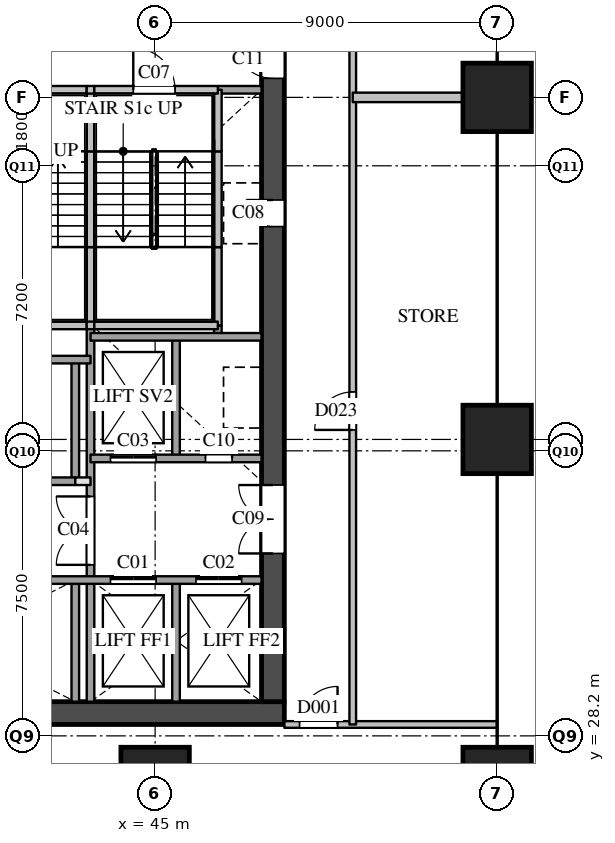
"""IFC4 building model, lengths in metres.
Left out: names, types, materials, properties, quantities, classifications, styles, units other than length and angle.
Written with IfcOpenShell. Run it as: python <this file> out.ifc"""

import sys

from ifc_helpers import new_model, si_unit, direction, frame, frame_2d, origin, origin_2d, place, context, subcontext, project, spatial, rectangle, extrude, element, fill, save


model = new_model("IFC4")
c1 = context("Model", 3, precision=1e-05, world=origin(), true_north=direction((0.0, 1.0)))
c2 = subcontext(c1, "Body", "Model", "MODEL_VIEW")
j1 = project(units=[si_unit("LENGTHUNIT", "METRE"), si_unit("PLANEANGLEUNIT", "RADIAN")], contexts=[c1])
p1 = place(None, origin())
s1 = spatial("IfcSite", under=j1, at=p1, CompositionType="ELEMENT")
p2 = place(p1, origin())
s2 = spatial("IfcBuilding", under=s1, at=p2, CompositionType="ELEMENT")
p3 = place(p2, frame((0.0, 0.0, 14.0)))
s3 = spatial("IfcBuildingStorey", under=s2, at=p3, CompositionType="ELEMENT", Elevation=14.0)
for number, where, z_axis, x_axis in (
    (1, (45.0, 27.0, 0.0), (0.0, 0.0, 1.0), (1.0, 0.0, 0.0)),
    (2, (54.0, 27.0, 0.0), (0.0, 0.0, 1.0), (1.0, 0.0, 0.0)),
    (3, (54.0, 36.0, 0.0), (0.0, 0.0, 1.0), (1.0, 0.0, 0.0)),
    (4, (54.0, 45.0, 0.0), (0.0, 0.0, 1.0), (1.0, 0.0, 0.0)),
):
    element("IfcColumn", number, at=place(p3, frame(where, z_axis=z_axis, x_axis=x_axis)), inside=s3, PredefinedType="COLUMN", context=c2, shape_type="SweptSolid", body=[
        extrude(rectangle(XDim=1.8, YDim=1.8, at=origin_2d()), origin(), (0.0, 0.0, 1.0), 7.0),
    ])
p4 = place(p3, frame((36.0, 28.8, 0.0), z_axis=(0.0, 0.0, 1.0), x_axis=(1.0, 0.0, 0.0)))
e5 = element("IfcWall", 5, at=p4, inside=s3, PredefinedType="SHEAR", context=c2, shape_type="SweptSolid", body=[
    extrude(rectangle(XDim=12.4, YDim=0.6, at=frame_2d((6.2, 0.0))), origin(), (0.0, 0.0, 1.0), 6.59),
])
p5 = place(p3, frame((48.1, 29.1, 0.0), z_axis=(0.0, 0.0, 1.0), x_axis=(0.0, 1.0, 0.0)))
e6 = element("IfcWall", 6, at=p5, inside=s3, PredefinedType="SHEAR", context=c2, shape_type="SweptSolid", body=[
    extrude(rectangle(XDim=20.3, YDim=0.6, at=frame_2d((10.15, 0.0))), origin(), (0.0, 0.0, 1.0), 6.59),
])
p6 = place(p5, frame((12.5, 0.0, 0.0)))
e7 = element("IfcOpeningElement", 7, at=p6, cuts=e6, PredefinedType="OPENING", context=c2, shape_type="SweptSolid", body=[
    extrude(rectangle(XDim=0.7, YDim=2.1, at=frame_2d((0.35, 1.05))), frame((0.0, 0.31, 0.0), z_axis=(0.0, -1.0, 0.0), x_axis=(1.0, 0.0, 0.0)), (0.0, 0.0, 1.0), 0.62),
])
p7 = place(p5, frame((3.9, 0.0, 0.0)))
e8 = element("IfcOpeningElement", 8, at=p7, cuts=e6, PredefinedType="OPENING", context=c2, shape_type="SweptSolid", body=[
    extrude(rectangle(XDim=1.8, YDim=2.1, at=frame_2d((0.9, 1.05))), frame((0.0, 0.31, 0.0), z_axis=(0.0, -1.0, 0.0), x_axis=(1.0, 0.0, 0.0)), (0.0, 0.0, 1.0), 0.62),
])
p8 = place(p5, frame((16.4, 0.0, 0.0)))
e9 = element("IfcOpeningElement", 9, at=p8, cuts=e6, PredefinedType="OPENING", context=c2, shape_type="SweptSolid", body=[
    extrude(rectangle(XDim=1.0, YDim=2.1, at=frame_2d((0.5, 1.05))), frame((0.0, 0.31, 0.0), z_axis=(0.0, -1.0, 0.0), x_axis=(1.0, 0.0, 0.0)), (0.0, 0.0, 1.0), 0.62),
])
p9 = place(p3, frame((42.9, 29.1, 0.0), z_axis=(0.0, 0.0, 1.0), x_axis=(0.0, 1.0, 0.0)))
e10 = element("IfcWall", 10, at=p9, inside=s3, PredefinedType="SOLIDWALL", context=c2, shape_type="SweptSolid", body=[
    extrude(rectangle(XDim=3.2, YDim=0.2, at=frame_2d((1.6, 0.0))), origin(), (0.0, 0.0, 1.0), 6.59),
])
p10 = place(p3, frame((42.9, 34.9, 0.0), z_axis=(0.0, 0.0, 1.0), x_axis=(0.0, 1.0, 0.0)))
e11 = element("IfcWall", 11, at=p10, inside=s3, PredefinedType="SOLIDWALL", context=c2, shape_type="SweptSolid", body=[
    extrude(rectangle(XDim=3.2, YDim=0.2, at=frame_2d((1.6, 0.0))), origin(), (0.0, 0.0, 1.0), 6.59),
])
p11 = place(p3, frame((43.3, 29.1, 0.0), z_axis=(0.0, 0.0, 1.0), x_axis=(0.0, 1.0, 0.0)))
e12 = element("IfcWall", 12, at=p11, inside=s3, PredefinedType="SOLIDWALL", context=c2, shape_type="SweptSolid", body=[
    extrude(rectangle(XDim=9.9, YDim=0.2, at=frame_2d((4.95, 0.0))), origin(), (0.0, 0.0, 1.0), 6.59),
])
p12 = place(p11, frame((3.6, 0.0, 0.0)))
e13 = element("IfcOpeningElement", 13, at=p12, cuts=e12, PredefinedType="OPENING", context=c2, shape_type="SweptSolid", body=[
    extrude(rectangle(XDim=1.8, YDim=2.1, at=frame_2d((0.9, 1.05))), frame((0.0, 0.11, 0.0), z_axis=(0.0, -1.0, 0.0), x_axis=(1.0, 0.0, 0.0)), (0.0, 0.0, 1.0), 0.22),
])
p13 = place(p3, frame((43.3, 39.0, 0.0), z_axis=(0.0, 0.0, 1.0), x_axis=(0.0, 1.0, 0.0)))
e14 = element("IfcWall", 14, at=p13, inside=s3, PredefinedType="SOLIDWALL", context=c2, shape_type="SweptSolid", body=[
    extrude(rectangle(XDim=2.06, YDim=0.2, at=frame_2d((1.03, 0.0))), origin(), (0.0, 0.0, 1.0), 6.59),
])
p14 = place(p3, frame((43.3, 41.06, 0.0), z_axis=(0.0, 0.0, 1.0), x_axis=(0.0, 1.0, 0.0)))
e15 = element("IfcWall", 15, at=p14, inside=s3, PredefinedType="SOLIDWALL", context=c2, shape_type="SweptSolid", body=[
    extrude(rectangle(XDim=2.52, YDim=0.2, at=frame_2d((1.26, 0.0))), origin(), (0.0, 0.0, 1.0), 6.59),
])
p15 = place(p3, frame((43.3, 43.58, 0.0), z_axis=(0.0, 0.0, 1.0), x_axis=(0.0, 1.0, 0.0)))
e16 = element("IfcWall", 16, at=p15, inside=s3, PredefinedType="SOLIDWALL", context=c2, shape_type="SweptSolid", body=[
    extrude(rectangle(XDim=1.62, YDim=0.2, at=frame_2d((0.81, 0.0))), origin(), (0.0, 0.0, 1.0), 6.59),
])
for number, where, z_axis, x_axis in (
    (17, (45.55, 29.1, 0.0), (0.0, 0.0, 1.0), (0.0, 1.0, 0.0)),
    (18, (45.55, 35.5, 0.0), (0.0, 0.0, 1.0), (0.0, 1.0, 0.0)),
):
    element("IfcWall", number, at=place(p3, frame(where, z_axis=z_axis, x_axis=x_axis)), inside=s3, PredefinedType="SOLIDWALL", context=c2, shape_type="SweptSolid", body=[
        extrude(rectangle(XDim=3.2, YDim=0.2, at=frame_2d((1.6, 0.0))), origin(), (0.0, 0.0, 1.0), 6.59),
    ])
p16 = place(p3, frame((46.65, 38.7, 0.0), z_axis=(0.0, 0.0, 1.0), x_axis=(0.0, 1.0, 0.0)))
e19 = element("IfcWall", 19, at=p16, inside=s3, PredefinedType="SOLIDWALL", context=c2, shape_type="SweptSolid", body=[
    extrude(rectangle(XDim=0.3, YDim=0.2, at=frame_2d((0.15, 0.0))), origin(), (0.0, 0.0, 1.0), 6.59),
])
p17 = place(p3, frame((46.65, 39.0, 0.0), z_axis=(0.0, 0.0, 1.0), x_axis=(0.0, 1.0, 0.0)))
e20 = element("IfcWall", 20, at=p17, inside=s3, PredefinedType="SOLIDWALL", context=c2, shape_type="SweptSolid", body=[
    extrude(rectangle(XDim=2.06, YDim=0.2, at=frame_2d((1.03, 0.0))), origin(), (0.0, 0.0, 1.0), 6.59),
])
p18 = place(p3, frame((46.65, 41.06, 0.0), z_axis=(0.0, 0.0, 1.0), x_axis=(0.0, 1.0, 0.0)))
e21 = element("IfcWall", 21, at=p18, inside=s3, PredefinedType="SOLIDWALL", context=c2, shape_type="SweptSolid", body=[
    extrude(rectangle(XDim=2.52, YDim=0.2, at=frame_2d((1.26, 0.0))), origin(), (0.0, 0.0, 1.0), 6.59),
])
p19 = place(p3, frame((46.65, 43.58, 0.0), z_axis=(0.0, 0.0, 1.0), x_axis=(0.0, 1.0, 0.0)))
e22 = element("IfcWall", 22, at=p19, inside=s3, PredefinedType="SOLIDWALL", context=c2, shape_type="SweptSolid", body=[
    extrude(rectangle(XDim=1.62, YDim=0.2, at=frame_2d((0.81, 0.0))), origin(), (0.0, 0.0, 1.0), 6.59),
])
p20 = place(p3, frame((36.6, 32.3, 0.0), z_axis=(0.0, 0.0, 1.0), x_axis=(1.0, 0.0, 0.0)))
e23 = element("IfcWall", 23, at=p20, inside=s3, PredefinedType="SOLIDWALL", context=c2, shape_type="SweptSolid", body=[
    extrude(rectangle(XDim=11.2, YDim=0.2, at=frame_2d((5.6, 0.0))), origin(), (0.0, 0.0, 1.0), 6.59),
])
p21 = place(p20, frame((7.225, 0.0, 0.0)))
e24 = element("IfcOpeningElement", 24, at=p21, cuts=e23, PredefinedType="OPENING", context=c2, shape_type="SweptSolid", body=[
    extrude(rectangle(XDim=1.2, YDim=2.1, at=frame_2d((0.6, 1.05))), frame((0.0, 0.11, 0.0), z_axis=(0.0, -1.0, 0.0), x_axis=(1.0, 0.0, 0.0)), (0.0, 0.0, 1.0), 0.22),
])
p22 = place(p20, frame((9.475, 0.0, 0.0)))
e25 = element("IfcOpeningElement", 25, at=p22, cuts=e23, PredefinedType="OPENING", context=c2, shape_type="SweptSolid", body=[
    extrude(rectangle(XDim=1.2, YDim=2.1, at=frame_2d((0.6, 1.05))), frame((0.0, 0.11, 0.0), z_axis=(0.0, -1.0, 0.0), x_axis=(1.0, 0.0, 0.0)), (0.0, 0.0, 1.0), 0.22),
])
p23 = place(p3, frame((42.9, 34.9, 0.0), z_axis=(0.0, 0.0, 1.0), x_axis=(1.0, 0.0, 0.0)))
e26 = element("IfcWall", 26, at=p23, inside=s3, PredefinedType="PARTITIONING", context=c2, shape_type="SweptSolid", body=[
    extrude(rectangle(XDim=0.4, YDim=0.2, at=frame_2d((0.2, 0.0))), origin(), (0.0, 0.0, 1.0), 6.59),
])
p24 = place(p3, frame((36.6, 34.9, 0.0), z_axis=(0.0, 0.0, 1.0), x_axis=(1.0, 0.0, 0.0)))
e27 = element("IfcWall", 27, at=p24, inside=s3, PredefinedType="SOLIDWALL", context=c2, shape_type="SweptSolid", body=[
    extrude(rectangle(XDim=6.3, YDim=0.2, at=frame_2d((3.15, 0.0))), origin(), (0.0, 0.0, 1.0), 6.59),
])
p25 = place(p3, frame((43.3, 35.5, 0.0), z_axis=(0.0, 0.0, 1.0), x_axis=(1.0, 0.0, 0.0)))
e28 = element("IfcWall", 28, at=p25, inside=s3, PredefinedType="SOLIDWALL", context=c2, shape_type="SweptSolid", body=[
    extrude(rectangle(XDim=4.5, YDim=0.2, at=frame_2d((2.25, 0.0))), origin(), (0.0, 0.0, 1.0), 6.59),
])
p26 = place(p25, frame((0.525, 0.0, 0.0)))
e29 = element("IfcOpeningElement", 29, at=p26, cuts=e28, PredefinedType="OPENING", context=c2, shape_type="SweptSolid", body=[
    extrude(rectangle(XDim=1.2, YDim=2.1, at=frame_2d((0.6, 1.05))), frame((0.0, 0.11, 0.0), z_axis=(0.0, -1.0, 0.0), x_axis=(1.0, 0.0, 0.0)), (0.0, 0.0, 1.0), 0.22),
])
p27 = place(p25, frame((3.025, 0.0, 0.0)))
e30 = element("IfcOpeningElement", 30, at=p27, cuts=e28, PredefinedType="OPENING", context=c2, shape_type="SweptSolid", body=[
    extrude(rectangle(XDim=0.7, YDim=2.1, at=frame_2d((0.35, 1.05))), frame((0.0, 0.11, 0.0), z_axis=(0.0, -1.0, 0.0), x_axis=(1.0, 0.0, 0.0)), (0.0, 0.0, 1.0), 0.22),
])
p28 = place(p3, frame((36.6, 38.1, 0.0), z_axis=(0.0, 0.0, 1.0), x_axis=(1.0, 0.0, 0.0)))
e31 = element("IfcWall", 31, at=p28, inside=s3, PredefinedType="SOLIDWALL", context=c2, shape_type="SweptSolid", body=[
    extrude(rectangle(XDim=6.7, YDim=0.2, at=frame_2d((3.35, 0.0))), origin(), (0.0, 0.0, 1.0), 6.59),
])
p29 = place(p3, frame((43.3, 38.7, 0.0), z_axis=(0.0, 0.0, 1.0), x_axis=(1.0, 0.0, 0.0)))
e32 = element("IfcWall", 32, at=p29, inside=s3, PredefinedType="SOLIDWALL", context=c2, shape_type="SweptSolid", body=[
    extrude(rectangle(XDim=4.5, YDim=0.2, at=frame_2d((2.25, 0.0))), origin(), (0.0, 0.0, 1.0), 6.59),
])
p30 = place(p3, frame((40.05, 39.0, 0.0), z_axis=(0.0, 0.0, 1.0), x_axis=(1.0, 0.0, 0.0)))
e33 = element("IfcWall", 33, at=p30, inside=s3, PredefinedType="SOLIDWALL", context=c2, shape_type="SweptSolid", body=[
    extrude(rectangle(XDim=3.15, YDim=0.2, at=frame_2d((1.575, 0.0))), origin(), (0.0, 0.0, 1.0), 6.59),
])
p31 = place(p3, frame((43.2, 39.0, 0.0), z_axis=(0.0, 0.0, 1.0), x_axis=(1.0, 0.0, 0.0)))
e34 = element("IfcWall", 34, at=p31, inside=s3, PredefinedType="SOLIDWALL", context=c2, shape_type="SweptSolid", body=[
    extrude(rectangle(XDim=0.2, YDim=0.2, at=frame_2d((0.1, 0.0))), origin(), (0.0, 0.0, 1.0), 6.59),
])
p32 = place(p3, frame((43.4, 39.0, 0.0), z_axis=(0.0, 0.0, 1.0), x_axis=(1.0, 0.0, 0.0)))
e35 = element("IfcWall", 35, at=p32, inside=s3, PredefinedType="SOLIDWALL", context=c2, shape_type="SweptSolid", body=[
    extrude(rectangle(XDim=3.25, YDim=0.2, at=frame_2d((1.625, 0.0))), origin(), (0.0, 0.0, 1.0), 6.59),
])
p33 = place(p3, frame((46.65, 45.2, 0.0), z_axis=(0.0, 0.0, 1.0), x_axis=(1.0, 0.0, 0.0)))
e36 = element("IfcWall", 36, at=p33, inside=s3, PredefinedType="SOLIDWALL", context=c2, shape_type="SweptSolid", body=[
    extrude(rectangle(XDim=1.15, YDim=0.2, at=frame_2d((0.575, 0.0))), origin(), (0.0, 0.0, 1.0), 6.59),
])
p34 = place(p3, frame((40.05, 45.2, 0.0), z_axis=(0.0, 0.0, 1.0), x_axis=(1.0, 0.0, 0.0)))
e37 = element("IfcWall", 37, at=p34, inside=s3, PredefinedType="SOLIDWALL", context=c2, shape_type="SweptSolid", body=[
    extrude(rectangle(XDim=3.15, YDim=0.2, at=frame_2d((1.575, 0.0))), origin(), (0.0, 0.0, 1.0), 6.59),
])
p35 = place(p34, frame((1.025, 0.0, 0.0)))
e38 = element("IfcOpeningElement", 38, at=p35, cuts=e37, PredefinedType="OPENING", context=c2, shape_type="SweptSolid", body=[
    extrude(rectangle(XDim=1.1, YDim=2.1, at=frame_2d((0.55, 1.05))), frame((0.0, 0.11, 0.0), z_axis=(0.0, -1.0, 0.0), x_axis=(1.0, 0.0, 0.0)), (0.0, 0.0, 1.0), 0.22),
])
p36 = place(p3, frame((43.2, 45.2, 0.0), z_axis=(0.0, 0.0, 1.0), x_axis=(1.0, 0.0, 0.0)))
e39 = element("IfcWall", 39, at=p36, inside=s3, PredefinedType="SOLIDWALL", context=c2, shape_type="SweptSolid", body=[
    extrude(rectangle(XDim=0.2, YDim=0.2, at=frame_2d((0.1, 0.0))), origin(), (0.0, 0.0, 1.0), 6.59),
])
p37 = place(p3, frame((43.4, 45.2, 0.0), z_axis=(0.0, 0.0, 1.0), x_axis=(1.0, 0.0, 0.0)))
e40 = element("IfcWall", 40, at=p37, inside=s3, PredefinedType="SOLIDWALL", context=c2, shape_type="SweptSolid", body=[
    extrude(rectangle(XDim=3.25, YDim=0.2, at=frame_2d((1.625, 0.0))), origin(), (0.0, 0.0, 1.0), 6.59),
])
p38 = place(p37, frame((1.025, 0.0, 0.0)))
e41 = element("IfcOpeningElement", 41, at=p38, cuts=e40, PredefinedType="OPENING", context=c2, shape_type="SweptSolid", body=[
    extrude(rectangle(XDim=1.1, YDim=2.1, at=frame_2d((0.55, 1.05))), frame((0.0, 0.11, 0.0), z_axis=(0.0, -1.0, 0.0), x_axis=(1.0, 0.0, 0.0)), (0.0, 0.0, 1.0), 0.22),
])
p39 = place(p3, frame((48.4, 28.5, 0.0), z_axis=(0.0, 0.0, 1.0), x_axis=(1.0, 0.0, 0.0)))
e42 = element("IfcWall", 42, at=p39, inside=s3, PredefinedType="PARTITIONING", context=c2, shape_type="SweptSolid", body=[
    extrude(rectangle(XDim=5.6, YDim=0.175, at=frame_2d((2.8, 0.0))), origin(), (0.0, 0.0, 1.0), 5.59),
])
p40 = place(p39, frame((0.4, 0.0, 0.0)))
e43 = element("IfcOpeningElement", 43, at=p40, cuts=e42, PredefinedType="OPENING", context=c2, shape_type="SweptSolid", body=[
    extrude(rectangle(XDim=1.0, YDim=2.1, at=frame_2d((0.5, 1.05))), frame((0.0, 0.097, 0.0), z_axis=(0.0, -1.0, 0.0), x_axis=(1.0, 0.0, 0.0)), (0.0, 0.0, 1.0), 0.195),
])
p41 = place(p3, frame((50.2, 28.5, 0.0), z_axis=(0.0, 0.0, 1.0), x_axis=(0.0, 1.0, 0.0)))
e44 = element("IfcWall", 44, at=p41, inside=s3, PredefinedType="PARTITIONING", context=c2, shape_type="SweptSolid", body=[
    extrude(rectangle(XDim=21.5, YDim=0.175, at=frame_2d((10.75, 0.0))), origin(), (0.0, 0.0, 1.0), 6.59),
])
p42 = place(p41, frame((18.5, 0.0, 0.0)))
e45 = element("IfcOpeningElement", 45, at=p42, cuts=e44, PredefinedType="OPENING", context=c2, shape_type="SweptSolid", body=[
    extrude(rectangle(XDim=1.0, YDim=2.1, at=frame_2d((0.5, 1.05))), frame((0.0, 0.097, 0.0), z_axis=(0.0, -1.0, 0.0), x_axis=(1.0, 0.0, 0.0)), (0.0, 0.0, 1.0), 0.195),
])
p43 = place(p41, frame((7.75, 0.0, 0.0)))
e46 = element("IfcOpeningElement", 46, at=p43, cuts=e44, PredefinedType="OPENING", context=c2, shape_type="SweptSolid", body=[
    extrude(rectangle(XDim=1.0, YDim=2.1, at=frame_2d((0.5, 1.05))), frame((0.0, 0.097, 0.0), z_axis=(0.0, -1.0, 0.0), x_axis=(1.0, 0.0, 0.0)), (0.0, 0.0, 1.0), 0.195),
])
p44 = place(p3, frame((50.2, 45.0, 0.0), z_axis=(0.0, 0.0, 1.0), x_axis=(1.0, 0.0, 0.0)))
e47 = element("IfcWall", 47, at=p44, inside=s3, PredefinedType="PARTITIONING", context=c2, shape_type="SweptSolid", body=[
    extrude(rectangle(XDim=3.8, YDim=0.25, at=frame_2d((1.9, 0.0))), origin(), (0.0, 0.0, 1.0), 6.59),
])
p45 = place(p21, origin())
e48 = element("IfcDoor", 48, at=p45, inside=s3, OperationType="SLIDING_TO_LEFT", PredefinedType="DOOR", context=c2, shape_type="SweptSolid", body=[
    extrude(rectangle(XDim=1.2, YDim=2.1, at=frame_2d((0.6, 1.05))), frame((0.0, 0.025, 0.0), z_axis=(0.0, -1.0, 0.0), x_axis=(1.0, 0.0, 0.0)), (0.0, 0.0, 1.0), 0.05),
])
fill(e24, e48)
p46 = place(p22, origin())
e49 = element("IfcDoor", 49, at=p46, inside=s3, OperationType="SLIDING_TO_LEFT", PredefinedType="DOOR", context=c2, shape_type="SweptSolid", body=[
    extrude(rectangle(XDim=1.2, YDim=2.1, at=frame_2d((0.6, 1.05))), frame((0.0, 0.025, 0.0), z_axis=(0.0, -1.0, 0.0), x_axis=(1.0, 0.0, 0.0)), (0.0, 0.0, 1.0), 0.05),
])
fill(e25, e49)
p47 = place(p26, origin())
e50 = element("IfcDoor", 50, at=p47, inside=s3, OperationType="SLIDING_TO_LEFT", PredefinedType="DOOR", context=c2, shape_type="SweptSolid", body=[
    extrude(rectangle(XDim=1.2, YDim=2.1, at=frame_2d((0.6, 1.05))), frame((0.0, 0.025, 0.0), z_axis=(0.0, -1.0, 0.0), x_axis=(1.0, 0.0, 0.0)), (0.0, 0.0, 1.0), 0.05),
])
fill(e29, e50)
p48 = place(p12, origin())
e51 = element("IfcDoor", 51, at=p48, inside=s3, OperationType="DOUBLE_DOOR_SINGLE_SWING", PredefinedType="DOOR", context=c2, shape_type="SweptSolid", body=[
    extrude(rectangle(XDim=1.8, YDim=2.1, at=frame_2d((0.9, 1.05))), frame((0.0, 0.025, 0.0), z_axis=(0.0, -1.0, 0.0), x_axis=(1.0, 0.0, 0.0)), (0.0, 0.0, 1.0), 0.05),
])
fill(e13, e51)
p49 = place(p38, origin())
e52 = element("IfcDoor", 52, at=p49, inside=s3, OperationType="SINGLE_SWING_LEFT", PredefinedType="DOOR", context=c2, shape_type="SweptSolid", body=[
    extrude(rectangle(XDim=1.1, YDim=2.1, at=frame_2d((0.55, 1.05))), frame((0.0, 0.025, 0.0), z_axis=(0.0, -1.0, 0.0), x_axis=(1.0, 0.0, 0.0)), (0.0, 0.0, 1.0), 0.05),
])
fill(e41, e52)
p50 = place(p6, origin())
e53 = element("IfcDoor", 53, at=p50, inside=s3, OperationType="SINGLE_SWING_RIGHT", PredefinedType="DOOR", context=c2, shape_type="SweptSolid", body=[
    extrude(rectangle(XDim=0.7, YDim=2.1, at=frame_2d((0.35, 1.05))), frame((0.0, 0.025, 0.0), z_axis=(0.0, -1.0, 0.0), x_axis=(1.0, 0.0, 0.0)), (0.0, 0.0, 1.0), 0.05),
])
fill(e7, e53)
p51 = place(p7, origin())
e54 = element("IfcDoor", 54, at=p51, inside=s3, OperationType="DOUBLE_DOOR_SINGLE_SWING", PredefinedType="DOOR", context=c2, shape_type="SweptSolid", body=[
    extrude(rectangle(XDim=1.8, YDim=2.1, at=frame_2d((0.9, 1.05))), frame((0.0, 0.025, 0.0), z_axis=(0.0, -1.0, 0.0), x_axis=(1.0, 0.0, 0.0)), (0.0, 0.0, 1.0), 0.05),
])
fill(e8, e54)
p52 = place(p27, origin())
e55 = element("IfcDoor", 55, at=p52, inside=s3, OperationType="SINGLE_SWING_RIGHT", PredefinedType="DOOR", context=c2, shape_type="SweptSolid", body=[
    extrude(rectangle(XDim=0.7, YDim=2.1, at=frame_2d((0.35, 1.05))), frame((0.0, 0.025, 0.0), z_axis=(0.0, -1.0, 0.0), x_axis=(1.0, 0.0, 0.0)), (0.0, 0.0, 1.0), 0.05),
])
fill(e30, e55)
p53 = place(p8, origin())
e56 = element("IfcDoor", 56, at=p53, inside=s3, OperationType="SINGLE_SWING_RIGHT", PredefinedType="DOOR", context=c2, shape_type="SweptSolid", body=[
    extrude(rectangle(XDim=1.0, YDim=2.1, at=frame_2d((0.5, 1.05))), frame((0.0, 0.025, 0.0), z_axis=(0.0, -1.0, 0.0), x_axis=(1.0, 0.0, 0.0)), (0.0, 0.0, 1.0), 0.05),
])
fill(e9, e56)
p54 = place(p40, origin())
e57 = element("IfcDoor", 57, at=p54, inside=s3, OperationType="SINGLE_SWING_RIGHT", PredefinedType="DOOR", context=c2, shape_type="SweptSolid", body=[
    extrude(rectangle(XDim=1.0, YDim=2.1, at=frame_2d((0.5, 1.05))), frame((0.0, 0.025, 0.0), z_axis=(0.0, -1.0, 0.0), x_axis=(1.0, 0.0, 0.0)), (0.0, 0.0, 1.0), 0.05),
])
fill(e43, e57)
p55 = place(p43, origin())
e58 = element("IfcDoor", 58, at=p55, inside=s3, OperationType="SINGLE_SWING_LEFT", PredefinedType="DOOR", context=c2, shape_type="SweptSolid", body=[
    extrude(rectangle(XDim=1.0, YDim=2.1, at=frame_2d((0.5, 1.05))), frame((0.0, 0.025, 0.0), z_axis=(0.0, -1.0, 0.0), x_axis=(1.0, 0.0, 0.0)), (0.0, 0.0, 1.0), 0.05),
])
fill(e46, e58)
save(model, sys.argv[1])
